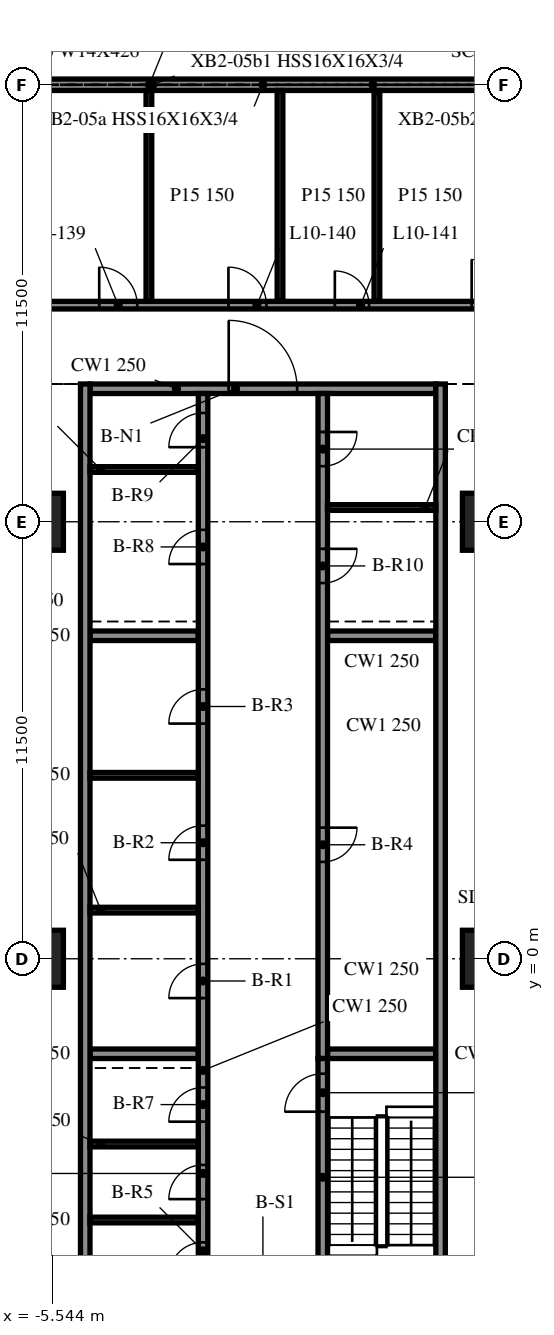
"""IFC4 building model, lengths in metres.
Left out: names, types, materials, properties, quantities, classifications, styles, units other than length and angle.
Written with IfcOpenShell. Run it as: python <this file> out.ifc"""

import sys

from ifc_helpers import new_model, si_unit, direction, frame, frame_2d, origin, origin_2d, place, context, subcontext, project, spatial, rectangle, extrude, element, fill, save


model = new_model("IFC4")
c1 = context("Model", 3, precision=1e-05, world=origin(), true_north=direction((0.0, 1.0)))
c2 = subcontext(c1, "Body", "Model", "MODEL_VIEW")
j1 = project(units=[si_unit("LENGTHUNIT", "METRE"), si_unit("PLANEANGLEUNIT", "RADIAN")], contexts=[c1])
p1 = place(None, origin())
s1 = spatial("IfcSite", under=j1, at=p1, CompositionType="ELEMENT")
p2 = place(p1, origin())
s2 = spatial("IfcBuilding", under=s1, at=p2, CompositionType="ELEMENT")
p3 = place(p2, frame((0.0, 0.0, 46.0)))
s3 = spatial("IfcBuildingStorey", under=s2, at=p3, CompositionType="ELEMENT", Elevation=46.0)
for number, where, z_axis, x_axis in (
    (1, (-6.0, 0.0, -0.34), (0.0, 0.0, 1.0), (1.0, 0.0, 0.0)),
    (2, (-6.0, 11.5, -0.34), (0.0, 0.0, 1.0), (1.0, 0.0, 0.0)),
    (3, (6.0, 0.0, -0.34), (0.0, 0.0, 1.0), (1.0, 0.0, 0.0)),
    (4, (6.0, 11.5, -0.34), (0.0, 0.0, 1.0), (1.0, 0.0, 0.0)),
):
    element("IfcColumn", number, at=place(p3, frame(where, z_axis=z_axis, x_axis=x_axis)), inside=s3, PredefinedType="COLUMN", context=c2, shape_type="SweptSolid", body=[
        extrude(rectangle(XDim=1.5, YDim=1.5, at=origin_2d()), origin(), (0.0, 0.0, 1.0), 4.3),
    ])
p4 = place(p3, frame((5.976, 23.0, 0.0), z_axis=(0.0, 0.0, 1.0), x_axis=(-1.0, 0.0, 0.0)))
e5 = element("IfcWall", 5, at=p4, inside=s3, PredefinedType="NOTDEFINED", context=c2, shape_type="SweptSolid", body=[
    extrude(rectangle(XDim=11.952, YDim=0.3, at=frame_2d((5.976, 0.0))), origin(), (0.0, 0.0, 1.0), 3.203),
])
for number, where, z_axis, x_axis in (
    (6, (-4.675, 15.125, 0.0), (0.0, 0.0, 1.0), (0.0, -1.0, 0.0)),
    (7, (4.675, -9.125, 0.0), (0.0, 0.0, 1.0), (0.0, 1.0, 0.0)),
):
    element("IfcWall", number, at=place(p3, frame(where, z_axis=z_axis, x_axis=x_axis)), inside=s3, PredefinedType="SOLIDWALL", context=c2, shape_type="SweptSolid", body=[
        extrude(rectangle(XDim=24.25, YDim=0.25, at=frame_2d((12.125, 0.0))), origin(), (0.0, 0.0, 1.0), 3.96),
    ])
p5 = place(p3, frame((-4.55, 15.0, 0.0), z_axis=(0.0, 0.0, 1.0), x_axis=(1.0, 0.0, 0.0)))
e8 = element("IfcWall", 8, at=p5, inside=s3, PredefinedType="SOLIDWALL", context=c2, shape_type="SweptSolid", body=[
    extrude(rectangle(XDim=9.1, YDim=0.25, at=frame_2d((4.55, 0.0))), origin(), (0.0, 0.0, 1.0), 3.96),
])
p6 = place(p5, frame((3.65, 0.0, 0.0)))
e9 = element("IfcOpeningElement", 9, at=p6, cuts=e8, PredefinedType="OPENING", context=c2, shape_type="SweptSolid", body=[
    extrude(rectangle(XDim=1.8, YDim=2.1, at=frame_2d((0.9, 1.05))), frame((0.0, 0.135, 0.0), z_axis=(0.0, -1.0, 0.0), x_axis=(1.0, 0.0, 0.0)), (0.0, 0.0, 1.0), 0.27),
])
p7 = place(p3, frame((-1.575, -8.875, 0.0), z_axis=(0.0, 0.0, 1.0), x_axis=(0.0, 1.0, 0.0)))
e10 = element("IfcWall", 10, at=p7, inside=s3, PredefinedType="SOLIDWALL", context=c2, shape_type="SweptSolid", body=[
    extrude(rectangle(XDim=23.75, YDim=0.25, at=frame_2d((11.875, 0.0))), origin(), (0.0, 0.0, 1.0), 3.96),
])
p8 = place(p7, frame((7.84, 0.0, 0.0)))
e11 = element("IfcOpeningElement", 11, at=p8, cuts=e10, PredefinedType="OPENING", context=c2, shape_type="SweptSolid", body=[
    extrude(rectangle(XDim=0.9, YDim=2.1, at=frame_2d((0.45, 1.05))), frame((0.0, 0.135, 0.0), z_axis=(0.0, -1.0, 0.0), x_axis=(1.0, 0.0, 0.0)), (0.0, 0.0, 1.0), 0.27),
])
p9 = place(p7, frame((11.479, 0.0, 0.0)))
e12 = element("IfcOpeningElement", 12, at=p9, cuts=e10, PredefinedType="OPENING", context=c2, shape_type="SweptSolid", body=[
    extrude(rectangle(XDim=0.9, YDim=2.1, at=frame_2d((0.45, 1.05))), frame((0.0, 0.135, 0.0), z_axis=(0.0, -1.0, 0.0), x_axis=(1.0, 0.0, 0.0)), (0.0, 0.0, 1.0), 0.27),
])
p10 = place(p7, frame((15.064, 0.0, 0.0)))
e13 = element("IfcOpeningElement", 13, at=p10, cuts=e10, PredefinedType="OPENING", context=c2, shape_type="SweptSolid", body=[
    extrude(rectangle(XDim=0.9, YDim=2.1, at=frame_2d((0.45, 1.05))), frame((0.0, 0.135, 0.0), z_axis=(0.0, -1.0, 0.0), x_axis=(1.0, 0.0, 0.0)), (0.0, 0.0, 1.0), 0.27),
])
p11 = place(p7, frame((0.512, 0.0, 0.0)))
e14 = element("IfcOpeningElement", 14, at=p11, cuts=e10, PredefinedType="OPENING", context=c2, shape_type="SweptSolid", body=[
    extrude(rectangle(XDim=0.9, YDim=2.1, at=frame_2d((0.45, 1.05))), frame((0.0, 0.135, 0.0), z_axis=(0.0, -1.0, 0.0), x_axis=(1.0, 0.0, 0.0)), (0.0, 0.0, 1.0), 0.27),
])
p12 = place(p7, frame((2.55, 0.0, 0.0)))
e15 = element("IfcOpeningElement", 15, at=p12, cuts=e10, PredefinedType="OPENING", context=c2, shape_type="SweptSolid", body=[
    extrude(rectangle(XDim=0.9, YDim=2.1, at=frame_2d((0.45, 1.05))), frame((0.0, 0.135, 0.0), z_axis=(0.0, -1.0, 0.0), x_axis=(1.0, 0.0, 0.0)), (0.0, 0.0, 1.0), 0.27),
])
p13 = place(p7, frame((4.587, 0.0, 0.0)))
e16 = element("IfcOpeningElement", 16, at=p13, cuts=e10, PredefinedType="OPENING", context=c2, shape_type="SweptSolid", body=[
    extrude(rectangle(XDim=0.9, YDim=2.1, at=frame_2d((0.45, 1.05))), frame((0.0, 0.135, 0.0), z_axis=(0.0, -1.0, 0.0), x_axis=(1.0, 0.0, 0.0)), (0.0, 0.0, 1.0), 0.27),
])
p14 = place(p7, frame((19.262, 0.0, 0.0)))
e17 = element("IfcOpeningElement", 17, at=p14, cuts=e10, PredefinedType="OPENING", context=c2, shape_type="SweptSolid", body=[
    extrude(rectangle(XDim=0.9, YDim=2.1, at=frame_2d((0.45, 1.05))), frame((0.0, 0.135, 0.0), z_axis=(0.0, -1.0, 0.0), x_axis=(1.0, 0.0, 0.0)), (0.0, 0.0, 1.0), 0.27),
])
p15 = place(p7, frame((22.337, 0.0, 0.0)))
e18 = element("IfcOpeningElement", 18, at=p15, cuts=e10, PredefinedType="OPENING", context=c2, shape_type="SweptSolid", body=[
    extrude(rectangle(XDim=0.9, YDim=2.1, at=frame_2d((0.45, 1.05))), frame((0.0, 0.135, 0.0), z_axis=(0.0, -1.0, 0.0), x_axis=(1.0, 0.0, 0.0)), (0.0, 0.0, 1.0), 0.27),
])
p16 = place(p3, frame((1.575, -8.875, 0.0), z_axis=(0.0, 0.0, 1.0), x_axis=(0.0, 1.0, 0.0)))
e19 = element("IfcWall", 19, at=p16, inside=s3, PredefinedType="SOLIDWALL", context=c2, shape_type="SweptSolid", body=[
    extrude(rectangle(XDim=6.25, YDim=0.25, at=frame_2d((3.125, 0.0))), origin(), (0.0, 0.0, 1.0), 3.96),
])
p17 = place(p16, frame((4.85, 0.0, 0.0)))
e20 = element("IfcOpeningElement", 20, at=p17, cuts=e19, PredefinedType="OPENING", context=c2, shape_type="SweptSolid", body=[
    extrude(rectangle(XDim=1.0, YDim=2.1, at=frame_2d((0.5, 1.05))), frame((0.0, 0.135, 0.0), z_axis=(0.0, -1.0, 0.0), x_axis=(1.0, 0.0, 0.0)), (0.0, 0.0, 1.0), 0.27),
])
p18 = place(p3, frame((1.575, 14.875, 0.0), z_axis=(0.0, 0.0, 1.0), x_axis=(0.0, -1.0, 0.0)))
e21 = element("IfcWall", 21, at=p18, inside=s3, PredefinedType="SOLIDWALL", context=c2, shape_type="SweptSolid", body=[
    extrude(rectangle(XDim=17.5, YDim=0.25, at=frame_2d((8.75, 0.0))), origin(), (0.0, 0.0, 1.0), 3.96),
])
p19 = place(p18, frame((11.425, 0.0, 0.0)))
e22 = element("IfcOpeningElement", 22, at=p19, cuts=e21, PredefinedType="OPENING", context=c2, shape_type="SweptSolid", body=[
    extrude(rectangle(XDim=0.9, YDim=2.1, at=frame_2d((0.45, 1.05))), frame((0.0, 0.135, 0.0), z_axis=(0.0, -1.0, 0.0), x_axis=(1.0, 0.0, 0.0)), (0.0, 0.0, 1.0), 0.27),
])
p20 = place(p18, frame((4.087, 0.0, 0.0)))
e23 = element("IfcOpeningElement", 23, at=p20, cuts=e21, PredefinedType="OPENING", context=c2, shape_type="SweptSolid", body=[
    extrude(rectangle(XDim=0.9, YDim=2.1, at=frame_2d((0.45, 1.05))), frame((0.0, 0.135, 0.0), z_axis=(0.0, -1.0, 0.0), x_axis=(1.0, 0.0, 0.0)), (0.0, 0.0, 1.0), 0.27),
])
p21 = place(p18, frame((1.012, 0.0, 0.0)))
e24 = element("IfcOpeningElement", 24, at=p21, cuts=e21, PredefinedType="OPENING", context=c2, shape_type="SweptSolid", body=[
    extrude(rectangle(XDim=0.9, YDim=2.1, at=frame_2d((0.45, 1.05))), frame((0.0, 0.135, 0.0), z_axis=(0.0, -1.0, 0.0), x_axis=(1.0, 0.0, 0.0)), (0.0, 0.0, 1.0), 0.27),
])
for number, where, z_axis, x_axis in (
    (25, (-4.55, -2.5, 0.0), (0.0, 0.0, 1.0), (1.0, 0.0, 0.0)),
    (26, (-4.55, 8.5, 0.0), (0.0, 0.0, 1.0), (1.0, 0.0, 0.0)),
    (27, (1.7, -2.5, 0.0), (0.0, 0.0, 1.0), (1.0, 0.0, 0.0)),
    (28, (1.7, 8.5, 0.0), (0.0, 0.0, 1.0), (1.0, 0.0, 0.0)),
):
    element("IfcWall", number, at=place(p3, frame(where, z_axis=z_axis, x_axis=x_axis)), inside=s3, PredefinedType="SOLIDWALL", context=c2, shape_type="SweptSolid", body=[
        extrude(rectangle(XDim=2.85, YDim=0.25, at=frame_2d((1.425, 0.0))), origin(), (0.0, 0.0, 1.0), 3.96),
    ])
for number, where, z_axis, x_axis in (
    (29, (-4.55, 1.28, 0.0), (0.0, 0.0, 1.0), (1.0, 0.0, 0.0)),
    (30, (-4.55, 4.827, 0.0), (0.0, 0.0, 1.0), (1.0, 0.0, 0.0)),
    (31, (-4.55, -6.875, 0.0), (0.0, 0.0, 1.0), (1.0, 0.0, 0.0)),
    (32, (-4.55, -4.875, 0.0), (0.0, 0.0, 1.0), (1.0, 0.0, 0.0)),
    (33, (-4.55, 12.875, 0.0), (0.0, 0.0, 1.0), (1.0, 0.0, 0.0)),
    (34, (1.7, 11.875, 0.0), (0.0, 0.0, 1.0), (1.0, 0.0, 0.0)),
):
    element("IfcWall", number, at=place(p3, frame(where, z_axis=z_axis, x_axis=x_axis)), inside=s3, PredefinedType="PARTITIONING", context=c2, shape_type="SweptSolid", body=[
        extrude(rectangle(XDim=2.85, YDim=0.15, at=frame_2d((1.425, 0.0))), origin(), (0.0, 0.0, 1.0), 3.96),
    ])
p22 = place(p3, frame((-41.807, 17.2, 0.0), z_axis=(0.0, 0.0, 1.0), x_axis=(1.0, 0.0, 0.0)))
e35 = element("IfcWall", 35, at=p22, inside=s3, PredefinedType="PARTITIONING", context=c2, shape_type="SweptSolid", body=[
    extrude(rectangle(XDim=95.615, YDim=0.2, at=frame_2d((47.807, 0.0))), origin(), (0.0, 0.0, 1.0), 3.96),
])
p23 = place(p22, frame((7.5, 0.0, 0.0)))
e36 = element("IfcOpeningElement", 36, at=p23, cuts=e35, PredefinedType="OPENING", context=c2, shape_type="SweptSolid", body=[
    extrude(rectangle(XDim=1.0, YDim=2.1, at=frame_2d((0.5, 1.05))), frame((0.0, 0.11, 0.0), z_axis=(0.0, -1.0, 0.0), x_axis=(1.0, 0.0, 0.0)), (0.0, 0.0, 1.0), 0.22),
])
p24 = place(p22, frame((10.9, 0.0, 0.0)))
e37 = element("IfcOpeningElement", 37, at=p24, cuts=e35, PredefinedType="OPENING", context=c2, shape_type="SweptSolid", body=[
    extrude(rectangle(XDim=1.0, YDim=2.1, at=frame_2d((0.5, 1.05))), frame((0.0, 0.11, 0.0), z_axis=(0.0, -1.0, 0.0), x_axis=(1.0, 0.0, 0.0)), (0.0, 0.0, 1.0), 0.22),
])
p25 = place(p22, frame((13.7, 0.0, 0.0)))
e38 = element("IfcOpeningElement", 38, at=p25, cuts=e35, PredefinedType="OPENING", context=c2, shape_type="SweptSolid", body=[
    extrude(rectangle(XDim=0.9, YDim=2.1, at=frame_2d((0.45, 1.05))), frame((0.0, 0.11, 0.0), z_axis=(0.0, -1.0, 0.0), x_axis=(1.0, 0.0, 0.0)), (0.0, 0.0, 1.0), 0.22),
])
p26 = place(p22, frame((22.3, 0.0, 0.0)))
e39 = element("IfcOpeningElement", 39, at=p26, cuts=e35, PredefinedType="OPENING", context=c2, shape_type="SweptSolid", body=[
    extrude(rectangle(XDim=1.2, YDim=2.1, at=frame_2d((0.6, 1.05))), frame((0.0, 0.11, 0.0), z_axis=(0.0, -1.0, 0.0), x_axis=(1.0, 0.0, 0.0)), (0.0, 0.0, 1.0), 0.22),
])
p27 = place(p22, frame((28.7, 0.0, 0.0)))
e40 = element("IfcOpeningElement", 40, at=p27, cuts=e35, PredefinedType="OPENING", context=c2, shape_type="SweptSolid", body=[
    extrude(rectangle(XDim=0.9, YDim=2.1, at=frame_2d((0.45, 1.05))), frame((0.0, 0.11, 0.0), z_axis=(0.0, -1.0, 0.0), x_axis=(1.0, 0.0, 0.0)), (0.0, 0.0, 1.0), 0.22),
])
p28 = place(p22, frame((37.5, 0.0, 0.0)))
e41 = element("IfcOpeningElement", 41, at=p28, cuts=e35, PredefinedType="OPENING", context=c2, shape_type="SweptSolid", body=[
    extrude(rectangle(XDim=1.0, YDim=2.1, at=frame_2d((0.5, 1.05))), frame((0.0, 0.11, 0.0), z_axis=(0.0, -1.0, 0.0), x_axis=(1.0, 0.0, 0.0)), (0.0, 0.0, 1.0), 0.22),
])
p29 = place(p22, frame((40.9, 0.0, 0.0)))
e42 = element("IfcOpeningElement", 42, at=p29, cuts=e35, PredefinedType="OPENING", context=c2, shape_type="SweptSolid", body=[
    extrude(rectangle(XDim=1.0, YDim=2.1, at=frame_2d((0.5, 1.05))), frame((0.0, 0.11, 0.0), z_axis=(0.0, -1.0, 0.0), x_axis=(1.0, 0.0, 0.0)), (0.0, 0.0, 1.0), 0.22),
])
p30 = place(p22, frame((43.7, 0.0, 0.0)))
e43 = element("IfcOpeningElement", 43, at=p30, cuts=e35, PredefinedType="OPENING", context=c2, shape_type="SweptSolid", body=[
    extrude(rectangle(XDim=0.9, YDim=2.1, at=frame_2d((0.45, 1.05))), frame((0.0, 0.11, 0.0), z_axis=(0.0, -1.0, 0.0), x_axis=(1.0, 0.0, 0.0)), (0.0, 0.0, 1.0), 0.22),
])
p31 = place(p22, frame((47.3, 0.0, 0.0)))
e44 = element("IfcOpeningElement", 44, at=p31, cuts=e35, PredefinedType="OPENING", context=c2, shape_type="SweptSolid", body=[
    extrude(rectangle(XDim=1.2, YDim=2.1, at=frame_2d((0.6, 1.05))), frame((0.0, 0.11, 0.0), z_axis=(0.0, -1.0, 0.0), x_axis=(1.0, 0.0, 0.0)), (0.0, 0.0, 1.0), 0.22),
])
p32 = place(p22, frame((54.1, 0.0, 0.0)))
e45 = element("IfcOpeningElement", 45, at=p32, cuts=e35, PredefinedType="OPENING", context=c2, shape_type="SweptSolid", body=[
    extrude(rectangle(XDim=0.9, YDim=2.1, at=frame_2d((0.45, 1.05))), frame((0.0, 0.11, 0.0), z_axis=(0.0, -1.0, 0.0), x_axis=(1.0, 0.0, 0.0)), (0.0, 0.0, 1.0), 0.22),
])
p33 = place(p22, frame((60.1, 0.0, 0.0)))
e46 = element("IfcOpeningElement", 46, at=p33, cuts=e35, PredefinedType="OPENING", context=c2, shape_type="SweptSolid", body=[
    extrude(rectangle(XDim=1.0, YDim=2.1, at=frame_2d((0.5, 1.05))), frame((0.0, 0.11, 0.0), z_axis=(0.0, -1.0, 0.0), x_axis=(1.0, 0.0, 0.0)), (0.0, 0.0, 1.0), 0.22),
])
p34 = place(p22, frame((69.1, 0.0, 0.0)))
e47 = element("IfcOpeningElement", 47, at=p34, cuts=e35, PredefinedType="OPENING", context=c2, shape_type="SweptSolid", body=[
    extrude(rectangle(XDim=1.0, YDim=2.1, at=frame_2d((0.5, 1.05))), frame((0.0, 0.11, 0.0), z_axis=(0.0, -1.0, 0.0), x_axis=(1.0, 0.0, 0.0)), (0.0, 0.0, 1.0), 0.22),
])
p35 = place(p22, frame((72.5, 0.0, 0.0)))
e48 = element("IfcOpeningElement", 48, at=p35, cuts=e35, PredefinedType="OPENING", context=c2, shape_type="SweptSolid", body=[
    extrude(rectangle(XDim=0.9, YDim=2.1, at=frame_2d((0.45, 1.05))), frame((0.0, 0.11, 0.0), z_axis=(0.0, -1.0, 0.0), x_axis=(1.0, 0.0, 0.0)), (0.0, 0.0, 1.0), 0.22),
])
p36 = place(p22, frame((75.1, 0.0, 0.0)))
e49 = element("IfcOpeningElement", 49, at=p36, cuts=e35, PredefinedType="OPENING", context=c2, shape_type="SweptSolid", body=[
    extrude(rectangle(XDim=1.2, YDim=2.1, at=frame_2d((0.6, 1.05))), frame((0.0, 0.11, 0.0), z_axis=(0.0, -1.0, 0.0), x_axis=(1.0, 0.0, 0.0)), (0.0, 0.0, 1.0), 0.22),
])
p37 = place(p22, frame((84.1, 0.0, 0.0)))
e50 = element("IfcOpeningElement", 50, at=p37, cuts=e35, PredefinedType="OPENING", context=c2, shape_type="SweptSolid", body=[
    extrude(rectangle(XDim=0.9, YDim=2.1, at=frame_2d((0.45, 1.05))), frame((0.0, 0.11, 0.0), z_axis=(0.0, -1.0, 0.0), x_axis=(1.0, 0.0, 0.0)), (0.0, 0.0, 1.0), 0.22),
])
p38 = place(p22, frame((90.1, 0.0, 0.0)))
e51 = element("IfcOpeningElement", 51, at=p38, cuts=e35, PredefinedType="OPENING", context=c2, shape_type="SweptSolid", body=[
    extrude(rectangle(XDim=1.0, YDim=2.1, at=frame_2d((0.5, 1.05))), frame((0.0, 0.11, 0.0), z_axis=(0.0, -1.0, 0.0), x_axis=(1.0, 0.0, 0.0)), (0.0, 0.0, 1.0), 0.22),
])
for number, where, z_axis, x_axis in (
    (52, (-3.0, 17.3, 0.0), (0.0, 0.0, 1.0), (0.0, 1.0, 0.0)),
    (53, (0.45, 17.3, 0.0), (0.0, 0.0, 1.0), (0.0, 1.0, 0.0)),
    (54, (3.0, 17.3, 0.0), (0.0, 0.0, 1.0), (0.0, 1.0, 0.0)),
):
    element("IfcWall", number, at=place(p3, frame(where, z_axis=z_axis, x_axis=x_axis)), inside=s3, PredefinedType="PARTITIONING", context=c2, shape_type="SweptSolid", body=[
        extrude(rectangle(XDim=5.55, YDim=0.15, at=frame_2d((2.775, 0.0))), origin(), (0.0, 0.0, 1.0), 3.96),
    ])
p39 = place(p6, origin())
e55 = element("IfcDoor", 55, at=p39, inside=s3, OperationType="DOUBLE_DOOR_SINGLE_SWING", PredefinedType="DOOR", context=c2, shape_type="SweptSolid", body=[
    extrude(rectangle(XDim=1.8, YDim=2.1, at=frame_2d((0.9, 1.05))), frame((0.0, 0.025, 0.0), z_axis=(0.0, -1.0, 0.0), x_axis=(1.0, 0.0, 0.0)), (0.0, 0.0, 1.0), 0.05),
])
fill(e9, e55)
p40 = place(p8, origin())
e56 = element("IfcDoor", 56, at=p40, inside=s3, OperationType="SINGLE_SWING_LEFT", PredefinedType="DOOR", context=c2, shape_type="SweptSolid", body=[
    extrude(rectangle(XDim=0.9, YDim=2.1, at=frame_2d((0.45, 1.05))), frame((0.0, 0.025, 0.0), z_axis=(0.0, -1.0, 0.0), x_axis=(1.0, 0.0, 0.0)), (0.0, 0.0, 1.0), 0.05),
])
fill(e11, e56)
p41 = place(p9, origin())
e57 = element("IfcDoor", 57, at=p41, inside=s3, OperationType="SINGLE_SWING_RIGHT", PredefinedType="DOOR", context=c2, shape_type="SweptSolid", body=[
    extrude(rectangle(XDim=0.9, YDim=2.1, at=frame_2d((0.45, 1.05))), frame((0.0, 0.025, 0.0), z_axis=(0.0, -1.0, 0.0), x_axis=(1.0, 0.0, 0.0)), (0.0, 0.0, 1.0), 0.05),
])
fill(e12, e57)
p42 = place(p10, origin())
e58 = element("IfcDoor", 58, at=p42, inside=s3, OperationType="SINGLE_SWING_LEFT", PredefinedType="DOOR", context=c2, shape_type="SweptSolid", body=[
    extrude(rectangle(XDim=0.9, YDim=2.1, at=frame_2d((0.45, 1.05))), frame((0.0, 0.025, 0.0), z_axis=(0.0, -1.0, 0.0), x_axis=(1.0, 0.0, 0.0)), (0.0, 0.0, 1.0), 0.05),
])
fill(e13, e58)
p43 = place(p19, origin())
e59 = element("IfcDoor", 59, at=p43, inside=s3, OperationType="SINGLE_SWING_RIGHT", PredefinedType="DOOR", context=c2, shape_type="SweptSolid", body=[
    extrude(rectangle(XDim=0.9, YDim=2.1, at=frame_2d((0.45, 1.05))), frame((0.0, 0.025, 0.0), z_axis=(0.0, -1.0, 0.0), x_axis=(1.0, 0.0, 0.0)), (0.0, 0.0, 1.0), 0.05),
])
fill(e22, e59)
p44 = place(p11, origin())
e60 = element("IfcDoor", 60, at=p44, inside=s3, OperationType="SINGLE_SWING_LEFT", PredefinedType="DOOR", context=c2, shape_type="SweptSolid", body=[
    extrude(rectangle(XDim=0.9, YDim=2.1, at=frame_2d((0.45, 1.05))), frame((0.0, 0.025, 0.0), z_axis=(0.0, -1.0, 0.0), x_axis=(1.0, 0.0, 0.0)), (0.0, 0.0, 1.0), 0.05),
])
fill(e14, e60)
p45 = place(p12, origin())
e61 = element("IfcDoor", 61, at=p45, inside=s3, OperationType="SINGLE_SWING_RIGHT", PredefinedType="DOOR", context=c2, shape_type="SweptSolid", body=[
    extrude(rectangle(XDim=0.9, YDim=2.1, at=frame_2d((0.45, 1.05))), frame((0.0, 0.025, 0.0), z_axis=(0.0, -1.0, 0.0), x_axis=(1.0, 0.0, 0.0)), (0.0, 0.0, 1.0), 0.05),
])
fill(e15, e61)
p46 = place(p13, origin())
e62 = element("IfcDoor", 62, at=p46, inside=s3, OperationType="SINGLE_SWING_LEFT", PredefinedType="DOOR", context=c2, shape_type="SweptSolid", body=[
    extrude(rectangle(XDim=0.9, YDim=2.1, at=frame_2d((0.45, 1.05))), frame((0.0, 0.025, 0.0), z_axis=(0.0, -1.0, 0.0), x_axis=(1.0, 0.0, 0.0)), (0.0, 0.0, 1.0), 0.05),
])
fill(e16, e62)
p47 = place(p14, origin())
e63 = element("IfcDoor", 63, at=p47, inside=s3, OperationType="SINGLE_SWING_RIGHT", PredefinedType="DOOR", context=c2, shape_type="SweptSolid", body=[
    extrude(rectangle(XDim=0.9, YDim=2.1, at=frame_2d((0.45, 1.05))), frame((0.0, 0.025, 0.0), z_axis=(0.0, -1.0, 0.0), x_axis=(1.0, 0.0, 0.0)), (0.0, 0.0, 1.0), 0.05),
])
fill(e17, e63)
p48 = place(p15, origin())
e64 = element("IfcDoor", 64, at=p48, inside=s3, OperationType="SINGLE_SWING_LEFT", PredefinedType="DOOR", context=c2, shape_type="SweptSolid", body=[
    extrude(rectangle(XDim=0.9, YDim=2.1, at=frame_2d((0.45, 1.05))), frame((0.0, 0.025, 0.0), z_axis=(0.0, -1.0, 0.0), x_axis=(1.0, 0.0, 0.0)), (0.0, 0.0, 1.0), 0.05),
])
fill(e18, e64)
p49 = place(p20, origin())
e65 = element("IfcDoor", 65, at=p49, inside=s3, OperationType="SINGLE_SWING_RIGHT", PredefinedType="DOOR", context=c2, shape_type="SweptSolid", body=[
    extrude(rectangle(XDim=0.9, YDim=2.1, at=frame_2d((0.45, 1.05))), frame((0.0, 0.025, 0.0), z_axis=(0.0, -1.0, 0.0), x_axis=(1.0, 0.0, 0.0)), (0.0, 0.0, 1.0), 0.05),
])
fill(e23, e65)
p50 = place(p21, origin())
e66 = element("IfcDoor", 66, at=p50, inside=s3, OperationType="SINGLE_SWING_LEFT", PredefinedType="DOOR", context=c2, shape_type="SweptSolid", body=[
    extrude(rectangle(XDim=0.9, YDim=2.1, at=frame_2d((0.45, 1.05))), frame((0.0, 0.025, 0.0), z_axis=(0.0, -1.0, 0.0), x_axis=(1.0, 0.0, 0.0)), (0.0, 0.0, 1.0), 0.05),
])
fill(e24, e66)
p51 = place(p17, origin())
e67 = element("IfcDoor", 67, at=p51, inside=s3, OperationType="SINGLE_SWING_RIGHT", PredefinedType="DOOR", context=c2, shape_type="SweptSolid", body=[
    extrude(rectangle(XDim=1.0, YDim=2.1, at=frame_2d((0.5, 1.05))), frame((0.0, 0.025, 0.0), z_axis=(0.0, -1.0, 0.0), x_axis=(1.0, 0.0, 0.0)), (0.0, 0.0, 1.0), 0.05),
])
fill(e20, e67)
p52 = place(p28, origin())
e68 = element("IfcDoor", 68, at=p52, inside=s3, OperationType="SINGLE_SWING_LEFT", PredefinedType="DOOR", context=c2, shape_type="SweptSolid", body=[
    extrude(rectangle(XDim=1.0, YDim=2.1, at=frame_2d((0.5, 1.05))), frame((0.0, 0.025, 0.0), z_axis=(0.0, -1.0, 0.0), x_axis=(1.0, 0.0, 0.0)), (0.0, 0.0, 1.0), 0.05),
])
fill(e41, e68)
p53 = place(p29, origin())
e69 = element("IfcDoor", 69, at=p53, inside=s3, OperationType="SINGLE_SWING_LEFT", PredefinedType="DOOR", context=c2, shape_type="SweptSolid", body=[
    extrude(rectangle(XDim=1.0, YDim=2.1, at=frame_2d((0.5, 1.05))), frame((0.0, 0.025, 0.0), z_axis=(0.0, -1.0, 0.0), x_axis=(1.0, 0.0, 0.0)), (0.0, 0.0, 1.0), 0.05),
])
fill(e42, e69)
p54 = place(p30, origin())
e70 = element("IfcDoor", 70, at=p54, inside=s3, OperationType="SINGLE_SWING_LEFT", PredefinedType="DOOR", context=c2, shape_type="SweptSolid", body=[
    extrude(rectangle(XDim=0.9, YDim=2.1, at=frame_2d((0.45, 1.05))), frame((0.0, 0.025, 0.0), z_axis=(0.0, -1.0, 0.0), x_axis=(1.0, 0.0, 0.0)), (0.0, 0.0, 1.0), 0.05),
])
fill(e43, e70)
p55 = place(p31, origin())
e71 = element("IfcDoor", 71, at=p55, inside=s3, OperationType="SINGLE_SWING_RIGHT", PredefinedType="DOOR", context=c2, shape_type="SweptSolid", body=[
    extrude(rectangle(XDim=1.2, YDim=2.1, at=frame_2d((0.6, 1.05))), frame((0.0, 0.025, 0.0), z_axis=(0.0, -1.0, 0.0), x_axis=(1.0, 0.0, 0.0)), (0.0, 0.0, 1.0), 0.05),
])
fill(e44, e71)
save(model, sys.argv[1])
